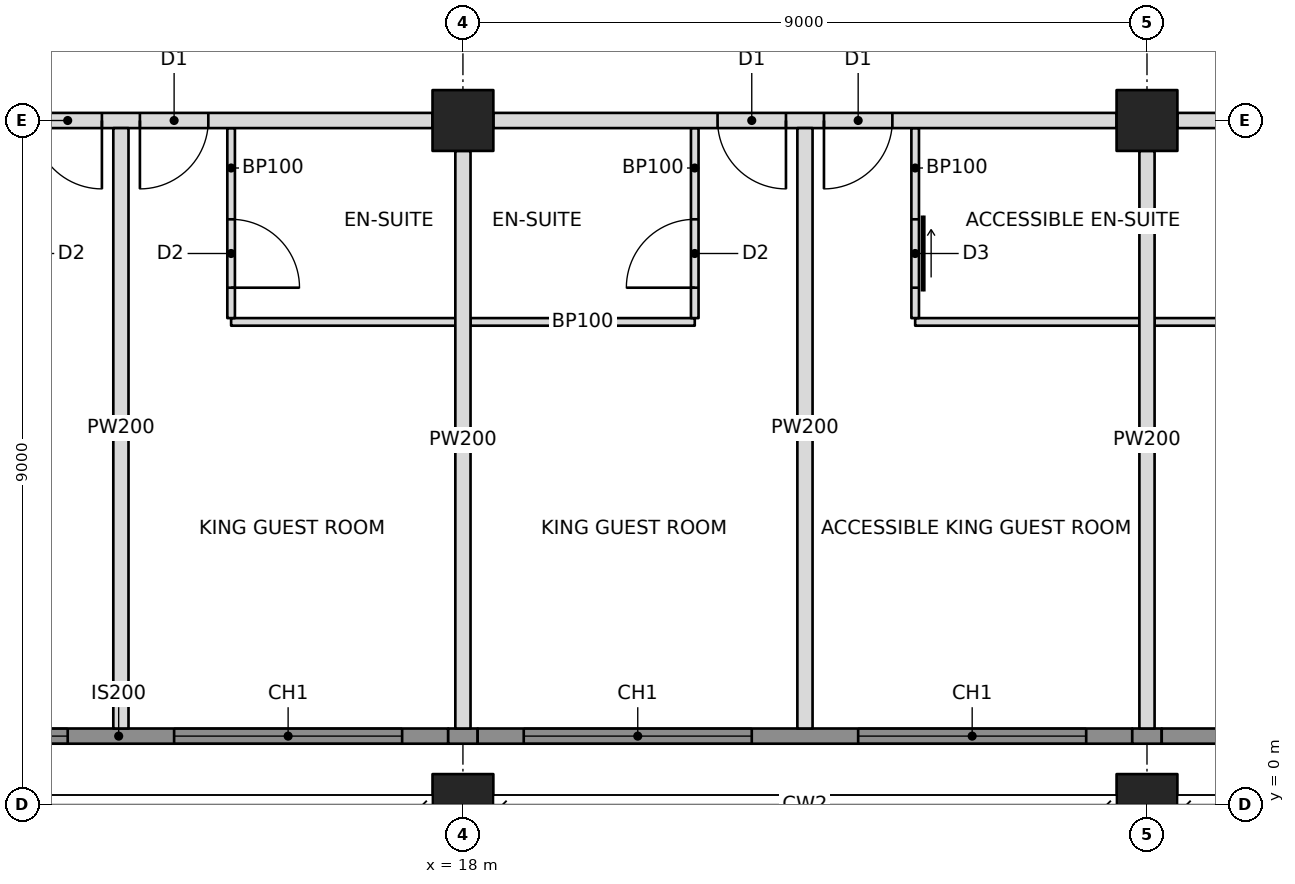
"""IFC4 building model, lengths in metres.
Left out: names, types, materials, properties, quantities, classifications, styles, units other than length and angle.
Written with IfcOpenShell. Run it as: python <this file> out.ifc"""

import sys

from ifc_helpers import new_model, si_unit, direction, frame, frame_2d, origin, origin_2d, place, context, subcontext, project, spatial, rectangle, hollow_rectangle, extrude, element, fill, save


model = new_model("IFC4")
c1 = context("Model", 3, precision=1e-05, world=origin(), true_north=direction((0.0, 1.0)))
c2 = subcontext(c1, "Body", "Model", "MODEL_VIEW")
j1 = project(units=[si_unit("LENGTHUNIT", "METRE"), si_unit("PLANEANGLEUNIT", "RADIAN")], contexts=[c1])
p1 = place(None, origin())
s1 = spatial("IfcSite", under=j1, at=p1, CompositionType="ELEMENT")
p2 = place(p1, origin())
s2 = spatial("IfcBuilding", under=s1, at=p2, CompositionType="ELEMENT")
p3 = place(p2, frame((0.0, 0.0, 255.4)))
s3 = spatial("IfcBuildingStorey", under=s2, at=p3, CompositionType="ELEMENT", Elevation=255.4)
for number, where, z_axis, x_axis in (
    (1, (18.0, 0.0, 0.0), (0.0, 0.0, 1.0), (1.0, 0.0, 0.0)),
    (2, (18.0, 9.0, 0.0), (0.0, 0.0, 1.0), (1.0, 0.0, 0.0)),
    (3, (27.0, 0.0, 0.0), (0.0, 0.0, 1.0), (1.0, 0.0, 0.0)),
    (4, (27.0, 9.0, 0.0), (0.0, 0.0, 1.0), (1.0, 0.0, 0.0)),
):
    element("IfcColumn", number, at=place(p3, frame(where, z_axis=z_axis, x_axis=x_axis)), inside=s3, PredefinedType="COLUMN", context=c2, shape_type="SweptSolid", body=[
        extrude(hollow_rectangle(XDim=0.8, YDim=0.8, WallThickness=0.032, at=origin_2d()), origin(), (0.0, 0.0, 1.0), 3.6),
    ])
p4 = place(p3, frame((9.4, 9.0, 0.0), z_axis=(0.0, 0.0, 1.0), x_axis=(1.0, 0.0, 0.0)))
e5 = element("IfcWall", 5, at=p4, inside=s3, PredefinedType="PARTITIONING", context=c2, shape_type="SweptSolid", body=[
    extrude(rectangle(XDim=8.2, YDim=0.2, at=frame_2d((4.1, 0.0))), origin(), (0.0, 0.0, 1.0), 2.605),
])
p5 = place(p4, frame((2.95, 0.0, 0.0)))
e6 = element("IfcOpeningElement", 6, at=p5, cuts=e5, PredefinedType="OPENING", context=c2, shape_type="SweptSolid", body=[
    extrude(rectangle(XDim=0.9, YDim=2.1, at=frame_2d((0.45, 1.05))), frame((0.0, 0.11, 0.0), z_axis=(0.0, -1.0, 0.0), x_axis=(1.0, 0.0, 0.0)), (0.0, 0.0, 1.0), 0.22),
])
p6 = place(p4, frame((4.35, 0.0, 0.0)))
e7 = element("IfcOpeningElement", 7, at=p6, cuts=e5, PredefinedType="OPENING", context=c2, shape_type="SweptSolid", body=[
    extrude(rectangle(XDim=0.9, YDim=2.1, at=frame_2d((0.45, 1.05))), frame((0.0, 0.11, 0.0), z_axis=(0.0, -1.0, 0.0), x_axis=(1.0, 0.0, 0.0)), (0.0, 0.0, 1.0), 0.22),
])
p7 = place(p3, frame((18.4, 9.0, 0.0), z_axis=(0.0, 0.0, 1.0), x_axis=(1.0, 0.0, 0.0)))
e8 = element("IfcWall", 8, at=p7, inside=s3, PredefinedType="PARTITIONING", context=c2, shape_type="SweptSolid", body=[
    extrude(rectangle(XDim=8.2, YDim=0.2, at=frame_2d((4.1, 0.0))), origin(), (0.0, 0.0, 1.0), 2.605),
])
p8 = place(p7, frame((2.95, 0.0, 0.0)))
e9 = element("IfcOpeningElement", 9, at=p8, cuts=e8, PredefinedType="OPENING", context=c2, shape_type="SweptSolid", body=[
    extrude(rectangle(XDim=0.9, YDim=2.1, at=frame_2d((0.45, 1.05))), frame((0.0, 0.11, 0.0), z_axis=(0.0, -1.0, 0.0), x_axis=(1.0, 0.0, 0.0)), (0.0, 0.0, 1.0), 0.22),
])
p9 = place(p7, frame((4.35, 0.0, 0.0)))
e10 = element("IfcOpeningElement", 10, at=p9, cuts=e8, PredefinedType="OPENING", context=c2, shape_type="SweptSolid", body=[
    extrude(rectangle(XDim=0.9, YDim=2.1, at=frame_2d((0.45, 1.05))), frame((0.0, 0.11, 0.0), z_axis=(0.0, -1.0, 0.0), x_axis=(1.0, 0.0, 0.0)), (0.0, 0.0, 1.0), 0.22),
])
p10 = place(p3, frame((27.4, 9.0, 0.0), z_axis=(0.0, 0.0, 1.0), x_axis=(1.0, 0.0, 0.0)))
e11 = element("IfcWall", 11, at=p10, inside=s3, PredefinedType="PARTITIONING", context=c2, shape_type="SweptSolid", body=[
    extrude(rectangle(XDim=8.378, YDim=0.2, at=frame_2d((4.189, 0.0))), origin(), (0.0, 0.0, 1.0), 2.605),
])
p11 = place(p10, frame((7.25, 0.0, 0.0)))
e12 = element("IfcOpeningElement", 12, at=p11, cuts=e11, PredefinedType="OPENING", context=c2, shape_type="SweptSolid", body=[
    extrude(rectangle(XDim=0.9, YDim=2.1, at=frame_2d((0.45, 1.05))), frame((0.0, 0.11, 0.0), z_axis=(0.0, -1.0, 0.0), x_axis=(1.0, 0.0, 0.0)), (0.0, 0.0, 1.0), 0.22),
])
p12 = place(p3, frame((13.5, 8.9, 0.0), z_axis=(0.0, 0.0, 1.0), x_axis=(0.0, -1.0, 0.0)))
e13 = element("IfcWall", 13, at=p12, inside=s3, PredefinedType="PARTITIONING", context=c2, shape_type="SweptSolid", body=[
    extrude(rectangle(XDim=7.9, YDim=0.2, at=frame_2d((3.95, 0.0))), origin(), (0.0, 0.0, 1.0), 2.604),
])
p13 = place(p3, frame((18.0, 8.6, 0.0), z_axis=(0.0, 0.0, 1.0), x_axis=(0.0, -1.0, 0.0)))
e14 = element("IfcWall", 14, at=p13, inside=s3, PredefinedType="PARTITIONING", context=c2, shape_type="SweptSolid", body=[
    extrude(rectangle(XDim=7.6, YDim=0.2, at=frame_2d((3.8, 0.0))), origin(), (0.0, 0.0, 1.0), 2.605),
])
p14 = place(p3, frame((22.5, 8.9, 0.0), z_axis=(0.0, 0.0, 1.0), x_axis=(0.0, -1.0, 0.0)))
e15 = element("IfcWall", 15, at=p14, inside=s3, PredefinedType="PARTITIONING", context=c2, shape_type="SweptSolid", body=[
    extrude(rectangle(XDim=7.9, YDim=0.2, at=frame_2d((3.95, 0.0))), origin(), (0.0, 0.0, 1.0), 2.604),
])
p15 = place(p3, frame((27.0, 8.6, 0.0), z_axis=(0.0, 0.0, 1.0), x_axis=(0.0, -1.0, 0.0)))
e16 = element("IfcWall", 16, at=p15, inside=s3, PredefinedType="PARTITIONING", context=c2, shape_type="SweptSolid", body=[
    extrude(rectangle(XDim=7.6, YDim=0.2, at=frame_2d((3.8, 0.0))), origin(), (0.0, 0.0, 1.0), 2.605),
])
p16 = place(p3, frame((14.95, 6.35, 0.0), z_axis=(0.0, 0.0, 1.0), x_axis=(1.0, 0.0, 0.0)))
e17 = element("IfcWall", 17, at=p16, inside=s3, PredefinedType="PARTITIONING", context=c2, shape_type="SweptSolid", body=[
    extrude(rectangle(XDim=2.95, YDim=0.1, at=frame_2d((1.475, 0.0))), origin(), (0.0, 0.0, 1.0), 2.604),
])
p17 = place(p3, frame((14.95, 8.9, 0.0), z_axis=(0.0, 0.0, 1.0), x_axis=(0.0, -1.0, 0.0)))
e18 = element("IfcWall", 18, at=p17, inside=s3, PredefinedType="PARTITIONING", context=c2, shape_type="SweptSolid", body=[
    extrude(rectangle(XDim=2.5, YDim=0.1, at=frame_2d((1.25, 0.0))), origin(), (0.0, 0.0, 1.0), 2.604),
])
p18 = place(p17, frame((1.2, 0.0, 0.0)))
e19 = element("IfcOpeningElement", 19, at=p18, cuts=e18, PredefinedType="OPENING", context=c2, shape_type="SweptSolid", body=[
    extrude(rectangle(XDim=0.9, YDim=2.1, at=frame_2d((0.45, 1.05))), frame((0.0, 0.06, 0.0), z_axis=(0.0, -1.0, 0.0), x_axis=(1.0, 0.0, 0.0)), (0.0, 0.0, 1.0), 0.12),
])
p19 = place(p3, frame((18.1, 6.35, 0.0), z_axis=(0.0, 0.0, 1.0), x_axis=(1.0, 0.0, 0.0)))
e20 = element("IfcWall", 20, at=p19, inside=s3, PredefinedType="PARTITIONING", context=c2, shape_type="SweptSolid", body=[
    extrude(rectangle(XDim=2.95, YDim=0.1, at=frame_2d((1.475, 0.0))), origin(), (0.0, 0.0, 1.0), 2.604),
])
p20 = place(p3, frame((21.05, 8.9, 0.0), z_axis=(0.0, 0.0, 1.0), x_axis=(0.0, -1.0, 0.0)))
e21 = element("IfcWall", 21, at=p20, inside=s3, PredefinedType="PARTITIONING", context=c2, shape_type="SweptSolid", body=[
    extrude(rectangle(XDim=2.5, YDim=0.1, at=frame_2d((1.25, 0.0))), origin(), (0.0, 0.0, 1.0), 2.604),
])
p21 = place(p20, frame((1.2, 0.0, 0.0)))
e22 = element("IfcOpeningElement", 22, at=p21, cuts=e21, PredefinedType="OPENING", context=c2, shape_type="SweptSolid", body=[
    extrude(rectangle(XDim=0.9, YDim=2.1, at=frame_2d((0.45, 1.05))), frame((0.0, 0.06, 0.0), z_axis=(0.0, -1.0, 0.0), x_axis=(1.0, 0.0, 0.0)), (0.0, 0.0, 1.0), 0.12),
])
p22 = place(p3, frame((23.95, 6.35, 0.0), z_axis=(0.0, 0.0, 1.0), x_axis=(1.0, 0.0, 0.0)))
e23 = element("IfcWall", 23, at=p22, inside=s3, PredefinedType="PARTITIONING", context=c2, shape_type="SweptSolid", body=[
    extrude(rectangle(XDim=2.95, YDim=0.1, at=frame_2d((1.475, 0.0))), origin(), (0.0, 0.0, 1.0), 2.604),
])
p23 = place(p3, frame((23.95, 8.9, 0.0), z_axis=(0.0, 0.0, 1.0), x_axis=(0.0, -1.0, 0.0)))
e24 = element("IfcWall", 24, at=p23, inside=s3, PredefinedType="PARTITIONING", context=c2, shape_type="SweptSolid", body=[
    extrude(rectangle(XDim=2.5, YDim=0.1, at=frame_2d((1.25, 0.0))), origin(), (0.0, 0.0, 1.0), 2.604),
])
p24 = place(p23, frame((1.2, 0.0, 0.0)))
e25 = element("IfcOpeningElement", 25, at=p24, cuts=e24, PredefinedType="OPENING", context=c2, shape_type="SweptSolid", body=[
    extrude(rectangle(XDim=0.9, YDim=2.1, at=frame_2d((0.45, 1.05))), frame((0.0, 0.06, 0.0), z_axis=(0.0, -1.0, 0.0), x_axis=(1.0, 0.0, 0.0)), (0.0, 0.0, 1.0), 0.12),
])
p25 = place(p3, frame((27.1, 6.35, 0.0), z_axis=(0.0, 0.0, 1.0), x_axis=(1.0, 0.0, 0.0)))
e26 = element("IfcWall", 26, at=p25, inside=s3, PredefinedType="PARTITIONING", context=c2, shape_type="SweptSolid", body=[
    extrude(rectangle(XDim=3.45, YDim=0.1, at=frame_2d((1.725, 0.0))), origin(), (0.0, 0.0, 1.0), 2.604),
])
p26 = place(p3, frame((9.135, 0.9, 0.0), z_axis=(0.0, 0.0, 1.0), x_axis=(1.0, 0.0, 0.0)))
e27 = element("IfcWall", 27, at=p26, inside=s3, PredefinedType="SOLIDWALL", context=c2, shape_type="SweptSolid", body=[
    extrude(rectangle(XDim=8.671, YDim=0.2, at=frame_2d((4.335, 0.0))), origin(), (0.0, 0.0, 1.0), 3.4),
])
p27 = place(p26, frame((0.665, 0.0, 0.6)))
e28 = element("IfcOpeningElement", 28, at=p27, cuts=e27, PredefinedType="OPENING", context=c2, shape_type="SweptSolid", body=[
    extrude(rectangle(XDim=3.0, YDim=2.2, at=frame_2d((1.5, 1.1))), frame((0.0, 0.11, 0.0), z_axis=(0.0, -1.0, 0.0), x_axis=(1.0, 0.0, 0.0)), (0.0, 0.0, 1.0), 0.22),
])
p28 = place(p26, frame((5.065, 0.0, 0.6)))
e29 = element("IfcOpeningElement", 29, at=p28, cuts=e27, PredefinedType="OPENING", context=c2, shape_type="SweptSolid", body=[
    extrude(rectangle(XDim=3.0, YDim=2.2, at=frame_2d((1.5, 1.1))), frame((0.0, 0.11, 0.0), z_axis=(0.0, -1.0, 0.0), x_axis=(1.0, 0.0, 0.0)), (0.0, 0.0, 1.0), 0.22),
])
p29 = place(p3, frame((17.806, 0.9, 0.0), z_axis=(0.0, 0.0, 1.0), x_axis=(1.0, 0.0, 0.0)))
e30 = element("IfcWall", 30, at=p29, inside=s3, PredefinedType="SOLIDWALL", context=c2, shape_type="SweptSolid", body=[
    extrude(rectangle(XDim=0.388, YDim=0.2, at=frame_2d((0.194, 0.0))), origin(), (0.0, 0.0, 1.0), 2.604),
])
p30 = place(p3, frame((18.194, 0.9, 0.0), z_axis=(0.0, 0.0, 1.0), x_axis=(1.0, 0.0, 0.0)))
e31 = element("IfcWall", 31, at=p30, inside=s3, PredefinedType="SOLIDWALL", context=c2, shape_type="SweptSolid", body=[
    extrude(rectangle(XDim=8.612, YDim=0.2, at=frame_2d((4.306, 0.0))), origin(), (0.0, 0.0, 1.0), 3.4),
])
p31 = place(p30, frame((0.606, 0.0, 0.6)))
e32 = element("IfcOpeningElement", 32, at=p31, cuts=e31, PredefinedType="OPENING", context=c2, shape_type="SweptSolid", body=[
    extrude(rectangle(XDim=3.0, YDim=2.2, at=frame_2d((1.5, 1.1))), frame((0.0, 0.11, 0.0), z_axis=(0.0, -1.0, 0.0), x_axis=(1.0, 0.0, 0.0)), (0.0, 0.0, 1.0), 0.22),
])
p32 = place(p30, frame((5.006, 0.0, 0.6)))
e33 = element("IfcOpeningElement", 33, at=p32, cuts=e31, PredefinedType="OPENING", context=c2, shape_type="SweptSolid", body=[
    extrude(rectangle(XDim=3.0, YDim=2.2, at=frame_2d((1.5, 1.1))), frame((0.0, 0.11, 0.0), z_axis=(0.0, -1.0, 0.0), x_axis=(1.0, 0.0, 0.0)), (0.0, 0.0, 1.0), 0.22),
])
p33 = place(p3, frame((26.806, 0.9, 0.0), z_axis=(0.0, 0.0, 1.0), x_axis=(1.0, 0.0, 0.0)))
e34 = element("IfcWall", 34, at=p33, inside=s3, PredefinedType="SOLIDWALL", context=c2, shape_type="SweptSolid", body=[
    extrude(rectangle(XDim=0.388, YDim=0.2, at=frame_2d((0.194, 0.0))), origin(), (0.0, 0.0, 1.0), 2.604),
])
p34 = place(p3, frame((27.194, 0.9, 0.0), z_axis=(0.0, 0.0, 1.0), x_axis=(1.0, 0.0, 0.0)))
e35 = element("IfcWall", 35, at=p34, inside=s3, PredefinedType="SOLIDWALL", context=c2, shape_type="SweptSolid", body=[
    extrude(rectangle(XDim=5.806, YDim=0.2, at=frame_2d((2.903, 0.0))), origin(), (0.0, 0.0, 1.0), 3.4),
])
p35 = place(p34, frame((1.356, 0.0, 0.6)))
e36 = element("IfcOpeningElement", 36, at=p35, cuts=e35, PredefinedType="OPENING", context=c2, shape_type="SweptSolid", body=[
    extrude(rectangle(XDim=3.0, YDim=2.2, at=frame_2d((1.5, 1.1))), frame((0.0, 0.11, 0.0), z_axis=(0.0, -1.0, 0.0), x_axis=(1.0, 0.0, 0.0)), (0.0, 0.0, 1.0), 0.22),
])
p36 = place(p27, origin())
e37 = element("IfcWindow", 37, at=p36, inside=s3, PartitioningType="TRIPLE_PANEL_VERTICAL", PredefinedType="WINDOW", context=c2, shape_type="SweptSolid", body=[
    extrude(rectangle(XDim=3.0, YDim=2.2, at=frame_2d((1.5, 1.1))), frame((0.0, 0.03, 0.0), z_axis=(0.0, -1.0, 0.0), x_axis=(1.0, 0.0, 0.0)), (0.0, 0.0, 1.0), 0.06),
])
fill(e28, e37)
p37 = place(p28, origin())
e38 = element("IfcWindow", 38, at=p37, inside=s3, PartitioningType="TRIPLE_PANEL_VERTICAL", PredefinedType="WINDOW", context=c2, shape_type="SweptSolid", body=[
    extrude(rectangle(XDim=3.0, YDim=2.2, at=frame_2d((1.5, 1.1))), frame((0.0, 0.03, 0.0), z_axis=(0.0, -1.0, 0.0), x_axis=(1.0, 0.0, 0.0)), (0.0, 0.0, 1.0), 0.06),
])
fill(e29, e38)
p38 = place(p31, origin())
e39 = element("IfcWindow", 39, at=p38, inside=s3, PartitioningType="TRIPLE_PANEL_VERTICAL", PredefinedType="WINDOW", context=c2, shape_type="SweptSolid", body=[
    extrude(rectangle(XDim=3.0, YDim=2.2, at=frame_2d((1.5, 1.1))), frame((0.0, 0.03, 0.0), z_axis=(0.0, -1.0, 0.0), x_axis=(1.0, 0.0, 0.0)), (0.0, 0.0, 1.0), 0.06),
])
fill(e32, e39)
p39 = place(p32, origin())
e40 = element("IfcWindow", 40, at=p39, inside=s3, PartitioningType="TRIPLE_PANEL_VERTICAL", PredefinedType="WINDOW", context=c2, shape_type="SweptSolid", body=[
    extrude(rectangle(XDim=3.0, YDim=2.2, at=frame_2d((1.5, 1.1))), frame((0.0, 0.03, 0.0), z_axis=(0.0, -1.0, 0.0), x_axis=(1.0, 0.0, 0.0)), (0.0, 0.0, 1.0), 0.06),
])
fill(e33, e40)
p40 = place(p5, frame((0.9, 0.0, 0.0), z_axis=(0.0, 0.0, 1.0), x_axis=(-1.0, 0.0, 0.0)))
e41 = element("IfcDoor", 41, at=p40, inside=s3, OperationType="SINGLE_SWING_LEFT", PredefinedType="DOOR", context=c2, shape_type="SweptSolid", body=[
    extrude(rectangle(XDim=0.9, YDim=2.1, at=frame_2d((0.45, 1.05))), frame((0.0, 0.025, 0.0), z_axis=(0.0, -1.0, 0.0), x_axis=(1.0, 0.0, 0.0)), (0.0, 0.0, 1.0), 0.05),
])
fill(e6, e41)
p41 = place(p18, origin())
e42 = element("IfcDoor", 42, at=p41, inside=s3, OperationType="SINGLE_SWING_RIGHT", PredefinedType="DOOR", context=c2, shape_type="SweptSolid", body=[
    extrude(rectangle(XDim=0.9, YDim=2.1, at=frame_2d((0.45, 1.05))), frame((0.0, 0.025, 0.0), z_axis=(0.0, -1.0, 0.0), x_axis=(1.0, 0.0, 0.0)), (0.0, 0.0, 1.0), 0.05),
])
fill(e19, e42)
p42 = place(p6, frame((0.9, 0.0, 0.0), z_axis=(0.0, 0.0, 1.0), x_axis=(-1.0, 0.0, 0.0)))
e43 = element("IfcDoor", 43, at=p42, inside=s3, OperationType="SINGLE_SWING_RIGHT", PredefinedType="DOOR", context=c2, shape_type="SweptSolid", body=[
    extrude(rectangle(XDim=0.9, YDim=2.1, at=frame_2d((0.45, 1.05))), frame((0.0, 0.025, 0.0), z_axis=(0.0, -1.0, 0.0), x_axis=(1.0, 0.0, 0.0)), (0.0, 0.0, 1.0), 0.05),
])
fill(e7, e43)
p43 = place(p21, frame((0.9, 0.0, 0.0), z_axis=(0.0, 0.0, 1.0), x_axis=(-1.0, 0.0, 0.0)))
e44 = element("IfcDoor", 44, at=p43, inside=s3, OperationType="SINGLE_SWING_LEFT", PredefinedType="DOOR", context=c2, shape_type="SweptSolid", body=[
    extrude(rectangle(XDim=0.9, YDim=2.1, at=frame_2d((0.45, 1.05))), frame((0.0, 0.025, 0.0), z_axis=(0.0, -1.0, 0.0), x_axis=(1.0, 0.0, 0.0)), (0.0, 0.0, 1.0), 0.05),
])
fill(e22, e44)
p44 = place(p8, frame((0.9, 0.0, 0.0), z_axis=(0.0, 0.0, 1.0), x_axis=(-1.0, 0.0, 0.0)))
e45 = element("IfcDoor", 45, at=p44, inside=s3, OperationType="SINGLE_SWING_LEFT", PredefinedType="DOOR", context=c2, shape_type="SweptSolid", body=[
    extrude(rectangle(XDim=0.9, YDim=2.1, at=frame_2d((0.45, 1.05))), frame((0.0, 0.025, 0.0), z_axis=(0.0, -1.0, 0.0), x_axis=(1.0, 0.0, 0.0)), (0.0, 0.0, 1.0), 0.05),
])
fill(e9, e45)
p45 = place(p24, origin())
e46 = element("IfcDoor", 46, at=p45, inside=s3, OperationType="SLIDING_TO_LEFT", PredefinedType="DOOR", context=c2, shape_type="SweptSolid", body=[
    extrude(rectangle(XDim=0.9, YDim=2.1, at=frame_2d((0.45, 1.05))), frame((0.0, 0.025, 0.0), z_axis=(0.0, -1.0, 0.0), x_axis=(1.0, 0.0, 0.0)), (0.0, 0.0, 1.0), 0.05),
])
fill(e25, e46)
p46 = place(p9, frame((0.9, 0.0, 0.0), z_axis=(0.0, 0.0, 1.0), x_axis=(-1.0, 0.0, 0.0)))
e47 = element("IfcDoor", 47, at=p46, inside=s3, OperationType="SINGLE_SWING_RIGHT", PredefinedType="DOOR", context=c2, shape_type="SweptSolid", body=[
    extrude(rectangle(XDim=0.9, YDim=2.1, at=frame_2d((0.45, 1.05))), frame((0.0, 0.025, 0.0), z_axis=(0.0, -1.0, 0.0), x_axis=(1.0, 0.0, 0.0)), (0.0, 0.0, 1.0), 0.05),
])
fill(e10, e47)
save(model, sys.argv[1])
